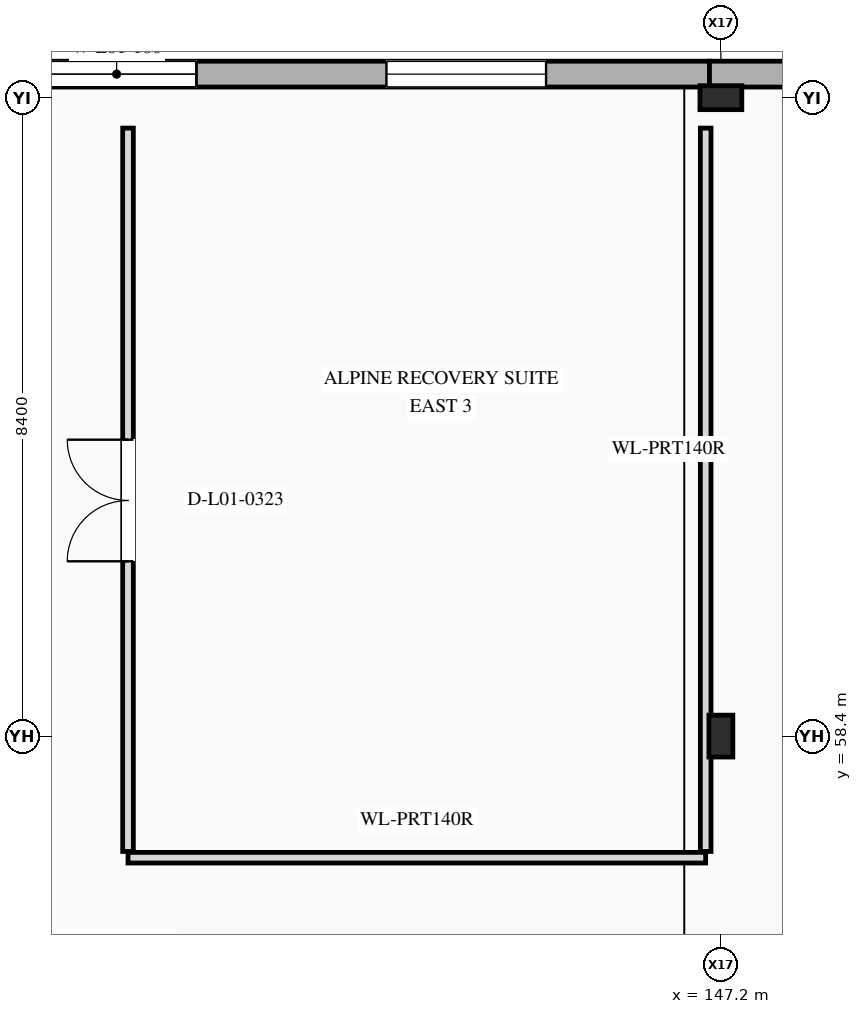
"""IFC4 building model, lengths in metres.
Left out: names, types, materials, properties, quantities, classifications, styles, units other than length and angle.
Written with IfcOpenShell. Run it as: python <this file> out.ifc"""

import sys

from ifc_helpers import new_model, si_unit, direction, frame, frame_2d, origin, origin_2d, place, context, subcontext, project, spatial, rectangle, i_section, extrude, element, fill, save


model = new_model("IFC4")
c1 = context("Model", 3, precision=1e-05, world=origin(), true_north=direction((0.0, 1.0)))
c2 = subcontext(c1, "Body", "Model", "MODEL_VIEW")
j1 = project(units=[si_unit("LENGTHUNIT", "METRE"), si_unit("PLANEANGLEUNIT", "RADIAN")], contexts=[c1])
p1 = place(None, origin())
s1 = spatial("IfcSite", under=j1, at=p1, CompositionType="ELEMENT")
p2 = place(p1, origin())
s2 = spatial("IfcBuilding", under=s1, at=p2, CompositionType="ELEMENT")
p3 = place(p2, frame((0.0, 0.0, 5.4)))
s3 = spatial("IfcBuildingStorey", under=s2, at=p3, CompositionType="ELEMENT", Elevation=5.4)
for number, where, z_axis, x_axis in (
    (1, (147.2, 58.4, 0.0), (0.0, 0.0, 1.0), (1.0, 0.0, 0.0)),
    (2, (147.2, 66.8, 0.0), (0.0, 0.0, 1.0), (0.0, 1.0, 0.0)),
):
    element("IfcColumn", number, at=place(p3, frame(where, z_axis=z_axis, x_axis=x_axis)), inside=s3, PredefinedType="COLUMN", context=c2, shape_type="SweptSolid", body=[
        extrude(i_section(OverallWidth=0.315, OverallDepth=0.551, WebThickness=0.015, FlangeThickness=0.024, at=origin_2d()), origin(), (0.0, 0.0, 1.0), 5.4),
    ])
p4 = place(p3, frame((136.0, 67.11, 0.0), z_axis=(0.0, 0.0, 1.0), x_axis=(1.0, 0.0, 0.0)))
e3 = element("IfcWall", 3, at=p4, inside=s3, PredefinedType="STANDARD", context=c2, shape_type="SweptSolid", body=[
    extrude(rectangle(XDim=11.05, YDim=0.34, at=frame_2d((5.525, 0.0))), origin(), (0.0, 0.0, 1.0), 5.4),
])
p5 = place(p4, frame((2.2, 0.0, 0.85)))
e4 = element("IfcOpeningElement", 4, at=p5, cuts=e3, PredefinedType="OPENING", context=c2, shape_type="SweptSolid", body=[
    extrude(rectangle(XDim=2.1, YDim=1.9, at=frame_2d((1.05, 0.95))), frame((0.0, 0.18, 0.0), z_axis=(0.0, -1.0, 0.0), x_axis=(1.0, 0.0, 0.0)), (0.0, 0.0, 1.0), 0.36),
])
p6 = place(p4, frame((6.8, 0.0, 0.85)))
e5 = element("IfcOpeningElement", 5, at=p6, cuts=e3, PredefinedType="OPENING", context=c2, shape_type="SweptSolid", body=[
    extrude(rectangle(XDim=2.1, YDim=1.9, at=frame_2d((1.05, 0.95))), frame((0.0, 0.18, 0.0), z_axis=(0.0, -1.0, 0.0), x_axis=(1.0, 0.0, 0.0)), (0.0, 0.0, 1.0), 0.36),
])
p7 = place(p3, frame((166.138, 67.11, 0.0), z_axis=(0.0, 0.0, 1.0), x_axis=(-1.0, 0.0, 0.0)))
e6 = element("IfcWall", 6, at=p7, inside=s3, PredefinedType="STANDARD", context=c2, shape_type="SweptSolid", body=[
    extrude(rectangle(XDim=19.088, YDim=0.34, at=frame_2d((9.544, 0.0))), origin(), (0.0, 0.0, 1.0), 5.4),
])
p8 = place(p7, frame((3.2, 0.0, 0.88)))
e7 = element("IfcOpeningElement", 7, at=p8, cuts=e6, PredefinedType="OPENING", context=c2, shape_type="SweptSolid", body=[
    extrude(rectangle(XDim=1.8, YDim=1.8, at=frame_2d((0.9, 0.9))), frame((0.0, 0.18, 0.0), z_axis=(0.0, -1.0, 0.0), x_axis=(1.0, 0.0, 0.0)), (0.0, 0.0, 1.0), 0.36),
])
p9 = place(p7, frame((13.5, 0.0, 0.88)))
e8 = element("IfcOpeningElement", 8, at=p9, cuts=e6, PredefinedType="OPENING", context=c2, shape_type="SweptSolid", body=[
    extrude(rectangle(XDim=1.8, YDim=1.8, at=frame_2d((0.9, 0.9))), frame((0.0, 0.18, 0.0), z_axis=(0.0, -1.0, 0.0), x_axis=(1.0, 0.0, 0.0)), (0.0, 0.0, 1.0), 0.36),
])
p10 = place(p3, frame((139.4, 56.8, 0.0), z_axis=(0.0, 0.0, 1.0), x_axis=(1.0, 0.0, 0.0)))
e9 = element("IfcWall", 9, at=p10, inside=s3, PredefinedType="PARTITIONING", context=c2, shape_type="SweptSolid", body=[
    extrude(rectangle(XDim=7.6, YDim=0.14, at=frame_2d((3.8, 0.0))), origin(), (0.0, 0.0, 1.0), 5.095),
])
p11 = place(p3, frame((139.4, 56.882, 0.0), z_axis=(0.0, 0.0, 1.0), x_axis=(0.0, 1.0, 0.0)))
e10 = element("IfcWall", 10, at=p11, inside=s3, PredefinedType="PARTITIONING", context=c2, shape_type="SweptSolid", body=[
    extrude(rectangle(XDim=9.518, YDim=0.14, at=frame_2d((4.759, 0.0))), origin(), (0.0, 0.0, 1.0), 4.333),
])
p12 = place(p11, frame((3.818, 0.0, 0.0)))
e11 = element("IfcOpeningElement", 11, at=p12, cuts=e10, PredefinedType="OPENING", context=c2, shape_type="SweptSolid", body=[
    extrude(rectangle(XDim=1.6, YDim=2.4, at=frame_2d((0.8, 1.2))), frame((0.0, 0.08, 0.0), z_axis=(0.0, -1.0, 0.0), x_axis=(1.0, 0.0, 0.0)), (0.0, 0.0, 1.0), 0.16),
])
p13 = place(p3, frame((147.0, 56.882, 0.0), z_axis=(0.0, 0.0, 1.0), x_axis=(0.0, 1.0, 0.0)))
e12 = element("IfcWall", 12, at=p13, inside=s3, PredefinedType="PARTITIONING", context=c2, shape_type="SweptSolid", body=[
    extrude(rectangle(XDim=9.518, YDim=0.14, at=frame_2d((4.759, 0.0))), origin(), (0.0, 0.0, 1.0), 4.333),
])
p14 = place(p5, origin())
e13 = element("IfcWindow", 13, at=p14, inside=s3, PartitioningType="SINGLE_PANEL", PredefinedType="WINDOW", context=c2, shape_type="SweptSolid", body=[
    extrude(rectangle(XDim=2.1, YDim=1.9, at=frame_2d((1.05, 0.95))), frame((0.0, 0.03, 0.0), z_axis=(0.0, -1.0, 0.0), x_axis=(1.0, 0.0, 0.0)), (0.0, 0.0, 1.0), 0.06),
])
fill(e4, e13)
p15 = place(p6, origin())
e14 = element("IfcWindow", 14, at=p15, inside=s3, PartitioningType="SINGLE_PANEL", PredefinedType="WINDOW", context=c2, shape_type="SweptSolid", body=[
    extrude(rectangle(XDim=2.1, YDim=1.9, at=frame_2d((1.05, 0.95))), frame((0.0, 0.03, 0.0), z_axis=(0.0, -1.0, 0.0), x_axis=(1.0, 0.0, 0.0)), (0.0, 0.0, 1.0), 0.06),
])
fill(e5, e14)
p16 = place(p12, origin())
e15 = element("IfcDoor", 15, at=p16, inside=s3, OperationType="DOUBLE_DOOR_SINGLE_SWING", PredefinedType="DOOR", context=c2, shape_type="SweptSolid", body=[
    extrude(rectangle(XDim=1.6, YDim=2.4, at=frame_2d((0.8, 1.2))), frame((0.0, 0.025, 0.0), z_axis=(0.0, -1.0, 0.0), x_axis=(1.0, 0.0, 0.0)), (0.0, 0.0, 1.0), 0.05),
])
fill(e11, e15)
save(model, sys.argv[1])
